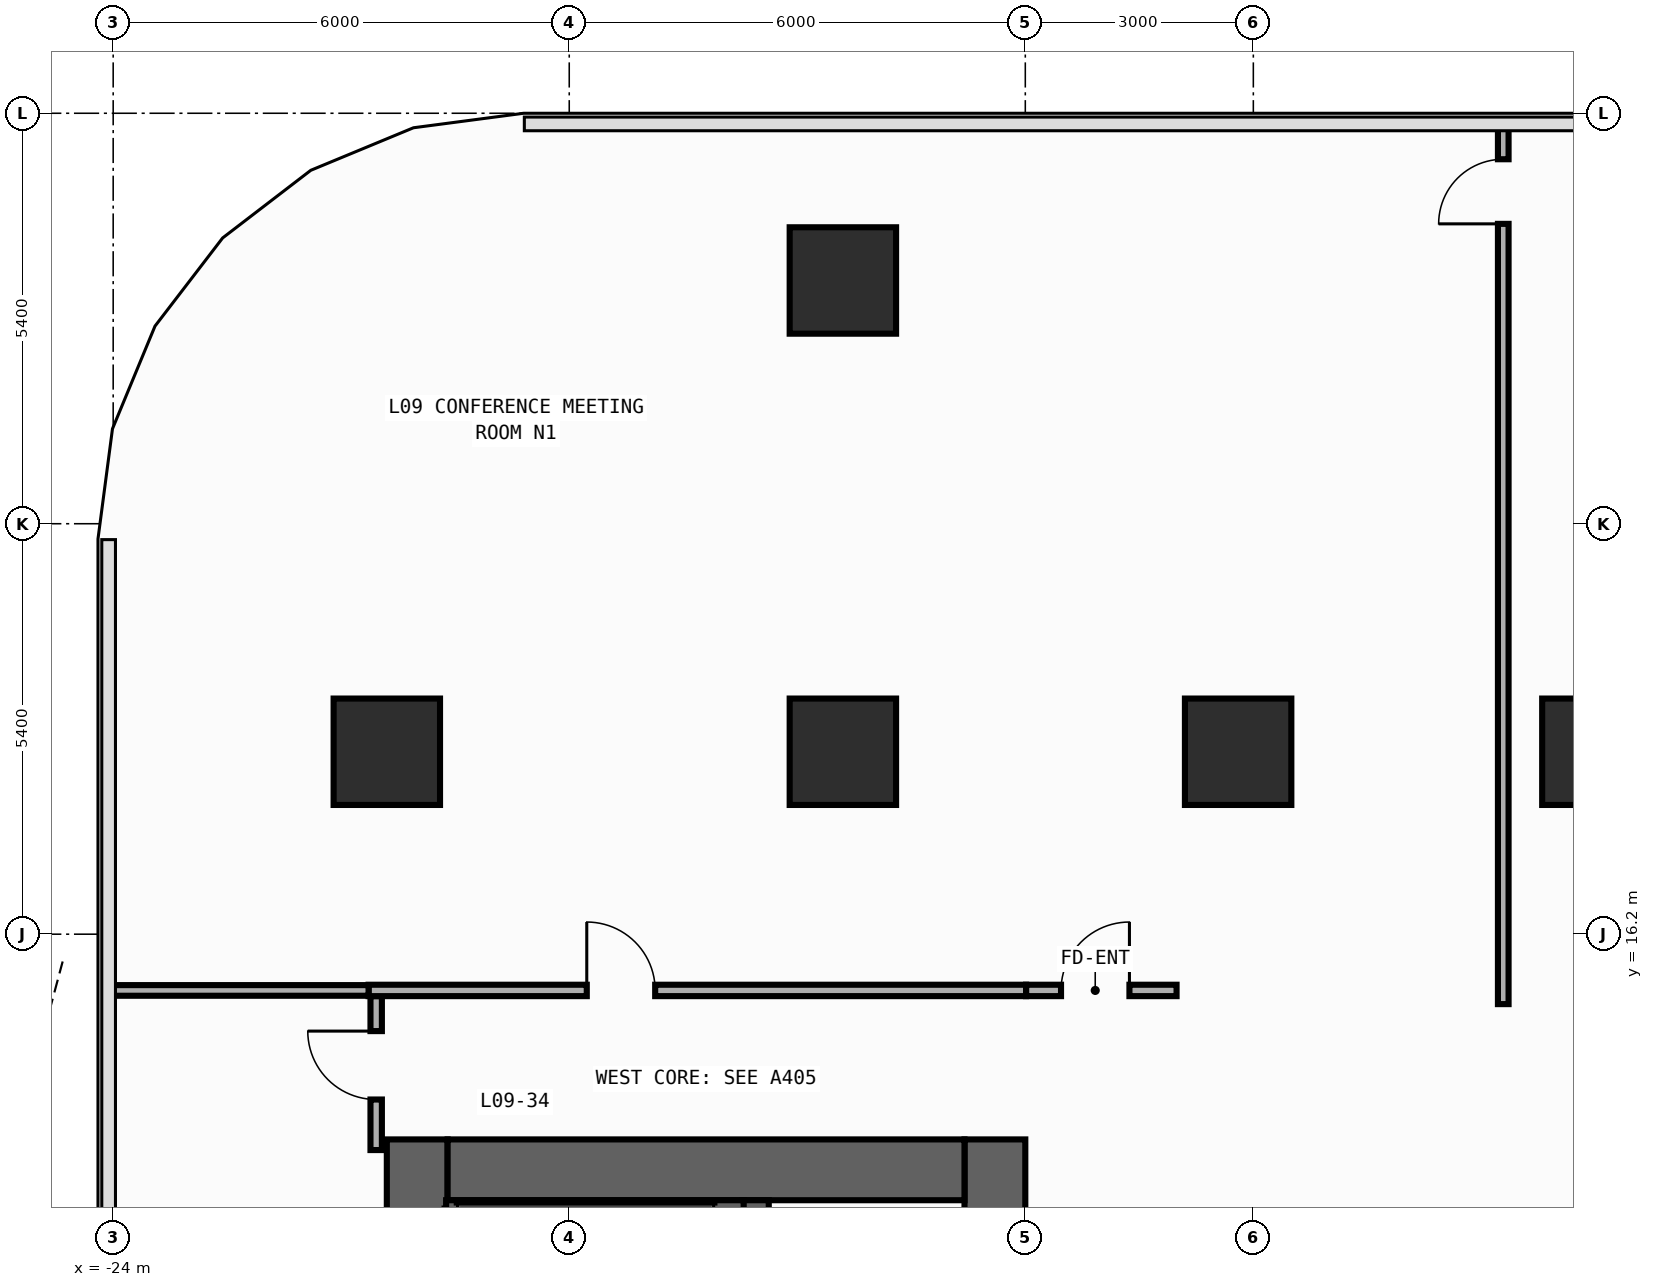
"""IFC4 building model, lengths in metres.
Left out: names, types, materials, properties, quantities, classifications, styles, units other than length and angle.
Written with IfcOpenShell. Run it as: python <this file> out.ifc"""

import sys

from ifc_helpers import new_model, si_unit, direction, frame, frame_2d, origin, origin_2d, place, context, subcontext, project, spatial, rectangle, extrude, element, fill, save


model = new_model("IFC4")
c1 = context("Model", 3, precision=1e-05, world=origin(), true_north=direction((0.0, 1.0)))
c2 = subcontext(c1, "Body", "Model", "MODEL_VIEW")
j1 = project(units=[si_unit("LENGTHUNIT", "METRE"), si_unit("PLANEANGLEUNIT", "RADIAN")], contexts=[c1])
p1 = place(None, origin())
s1 = spatial("IfcSite", under=j1, at=p1, CompositionType="ELEMENT")
p2 = place(p1, origin())
s2 = spatial("IfcBuilding", under=s1, at=p2, CompositionType="ELEMENT")
p3 = place(p2, frame((0.0, 0.0, 38.6)))
s3 = spatial("IfcBuildingStorey", under=s2, at=p3, CompositionType="ELEMENT", Elevation=38.6)
p4 = place(p3, frame((-20.0, -13.5, 0.0), z_axis=(0.0, 0.0, 1.0), x_axis=(0.0, 1.0, 0.0)))
e1 = element("IfcWall", 1, at=p4, inside=s3, PredefinedType="SHEAR", context=c2, shape_type="SweptSolid", body=[
    extrude(rectangle(XDim=27.0, YDim=0.8, at=frame_2d((13.5, 0.0))), origin(), (0.0, 0.0, 1.0), 3.94),
])
p5 = place(p3, frame((-12.4, -13.5, 0.0), z_axis=(0.0, 0.0, 1.0), x_axis=(0.0, 1.0, 0.0)))
e2 = element("IfcWall", 2, at=p5, inside=s3, PredefinedType="SHEAR", context=c2, shape_type="SweptSolid", body=[
    extrude(rectangle(XDim=27.0, YDim=0.8, at=frame_2d((13.5, 0.0))), origin(), (0.0, 0.0, 1.0), 3.94),
])
p6 = place(p5, frame((21.55, 0.0, 0.0)))
e3 = element("IfcOpeningElement", 3, at=p6, cuts=e2, PredefinedType="OPENING", context=c2, shape_type="SweptSolid", body=[
    extrude(rectangle(XDim=1.1, YDim=2.2, at=frame_2d((0.55, 1.1))), frame((0.0, 0.41, 0.0), z_axis=(0.0, -1.0, 0.0), x_axis=(1.0, 0.0, 0.0)), (0.0, 0.0, 1.0), 0.82),
])
p7 = place(p5, frame((18.35, 0.0, 0.0)))
e4 = element("IfcOpeningElement", 4, at=p7, cuts=e2, PredefinedType="OPENING", context=c2, shape_type="SweptSolid", body=[
    extrude(rectangle(XDim=1.1, YDim=2.2, at=frame_2d((0.55, 1.1))), frame((0.0, 0.41, 0.0), z_axis=(0.0, -1.0, 0.0), x_axis=(1.0, 0.0, 0.0)), (0.0, 0.0, 1.0), 0.82),
])
p8 = place(p5, frame((15.15, 0.0, 0.0)))
e5 = element("IfcOpeningElement", 5, at=p8, cuts=e2, PredefinedType="OPENING", context=c2, shape_type="SweptSolid", body=[
    extrude(rectangle(XDim=1.1, YDim=2.2, at=frame_2d((0.55, 1.1))), frame((0.0, 0.41, 0.0), z_axis=(0.0, -1.0, 0.0), x_axis=(1.0, 0.0, 0.0)), (0.0, 0.0, 1.0), 0.82),
])
p9 = place(p5, frame((10.35, 0.0, 0.0)))
e6 = element("IfcOpeningElement", 6, at=p9, cuts=e2, PredefinedType="OPENING", context=c2, shape_type="SweptSolid", body=[
    extrude(rectangle(XDim=1.1, YDim=2.2, at=frame_2d((0.55, 1.1))), frame((0.0, 0.41, 0.0), z_axis=(0.0, -1.0, 0.0), x_axis=(1.0, 0.0, 0.0)), (0.0, 0.0, 1.0), 0.82),
])
p10 = place(p5, frame((7.15, 0.0, 0.0)))
e7 = element("IfcOpeningElement", 7, at=p10, cuts=e2, PredefinedType="OPENING", context=c2, shape_type="SweptSolid", body=[
    extrude(rectangle(XDim=1.1, YDim=2.2, at=frame_2d((0.55, 1.1))), frame((0.0, 0.41, 0.0), z_axis=(0.0, -1.0, 0.0), x_axis=(1.0, 0.0, 0.0)), (0.0, 0.0, 1.0), 0.82),
])
p11 = place(p5, frame((3.95, 0.0, 0.0)))
e8 = element("IfcOpeningElement", 8, at=p11, cuts=e2, PredefinedType="OPENING", context=c2, shape_type="SweptSolid", body=[
    extrude(rectangle(XDim=1.1, YDim=2.2, at=frame_2d((0.55, 1.1))), frame((0.0, 0.41, 0.0), z_axis=(0.0, -1.0, 0.0), x_axis=(1.0, 0.0, 0.0)), (0.0, 0.0, 1.0), 0.82),
])
p12 = place(p5, frame((12.725, 0.0, 0.0)))
e9 = element("IfcOpeningElement", 9, at=p12, cuts=e2, PredefinedType="OPENING", context=c2, shape_type="SweptSolid", body=[
    extrude(rectangle(XDim=1.15, YDim=2.2, at=frame_2d((0.575, 1.1))), frame((0.0, 0.41, 0.0), z_axis=(0.0, -1.0, 0.0), x_axis=(1.0, 0.0, 0.0)), (0.0, 0.0, 1.0), 0.82),
])
p13 = place(p5, frame((1.625, 0.0, 0.0)))
e10 = element("IfcOpeningElement", 10, at=p13, cuts=e2, PredefinedType="OPENING", context=c2, shape_type="SweptSolid", body=[
    extrude(rectangle(XDim=0.85, YDim=2.1, at=frame_2d((0.425, 1.05))), frame((0.0, 0.41, 0.0), z_axis=(0.0, -1.0, 0.0), x_axis=(1.0, 0.0, 0.0)), (0.0, 0.0, 1.0), 0.82),
])
p14 = place(p3, frame((-19.6, 13.1, 0.0), z_axis=(0.0, 0.0, 1.0), x_axis=(1.0, 0.0, 0.0)))
e11 = element("IfcWall", 11, at=p14, inside=s3, PredefinedType="SHEAR", context=c2, shape_type="SweptSolid", body=[
    extrude(rectangle(XDim=6.8, YDim=0.8, at=frame_2d((3.4, 0.0))), origin(), (0.0, 0.0, 1.0), 3.94),
])
p15 = place(p3, frame((-15.55, -12.7, 0.0), z_axis=(0.0, 0.0, 1.0), x_axis=(0.0, 1.0, 0.0)))
e12 = element("IfcWall", 12, at=p15, inside=s3, PredefinedType="SHEAR", context=c2, shape_type="SweptSolid", body=[
    extrude(rectangle(XDim=25.4, YDim=0.35, at=frame_2d((12.7, 0.0))), origin(), (0.0, 0.0, 1.0), 3.94),
])
p16 = place(p15, frame((11.925, 0.0, 0.0)))
e13 = element("IfcOpeningElement", 13, at=p16, cuts=e12, PredefinedType="OPENING", context=c2, shape_type="SweptSolid", body=[
    extrude(rectangle(XDim=1.15, YDim=2.2, at=frame_2d((0.575, 1.1))), frame((0.0, 0.185, 0.0), z_axis=(0.0, -1.0, 0.0), x_axis=(1.0, 0.0, 0.0)), (0.0, 0.0, 1.0), 0.37),
])
p17 = place(p15, frame((0.825, 0.0, 0.0)))
e14 = element("IfcOpeningElement", 14, at=p17, cuts=e12, PredefinedType="OPENING", context=c2, shape_type="SweptSolid", body=[
    extrude(rectangle(XDim=0.85, YDim=2.1, at=frame_2d((0.425, 1.05))), frame((0.0, 0.185, 0.0), z_axis=(0.0, -1.0, 0.0), x_axis=(1.0, 0.0, 0.0)), (0.0, 0.0, 1.0), 0.37),
])
p18 = place(p3, frame((-19.62, 12.59, 0.0), z_axis=(0.0, 0.0, 1.0), x_axis=(1.0, 0.0, 0.0)))
e15 = element("IfcWall", 15, at=p18, inside=s3, PredefinedType="SHEAR", context=c2, shape_type="SweptSolid", body=[
    extrude(rectangle(XDim=3.915, YDim=0.22, at=frame_2d((1.958, 0.0))), origin(), (0.0, 0.0, 1.0), 3.94),
])
for number, where, z_axis, x_axis in (
    (16, (-9.2, 18.6, 0.0), (0.0, 0.0, 1.0), (1.0, 0.0, 0.0)),
    (17, (-20.4, 18.6, 0.0), (0.0, 0.0, 1.0), (1.0, 0.0, 0.0)),
    (18, (-14.4, 18.6, 0.0), (0.0, 0.0, 1.0), (1.0, 0.0, 0.0)),
    (19, (-4.5, 18.6, 0.0), (0.0, 0.0, 1.0), (1.0, 0.0, 0.0)),
    (20, (-14.4, 24.8, 0.0), (0.0, 0.0, 1.0), (1.0, 0.0, 0.0)),
):
    element("IfcColumn", number, at=place(p3, frame(where, z_axis=z_axis, x_axis=x_axis)), inside=s3, PredefinedType="COLUMN", context=c2, shape_type="SweptSolid", body=[
        extrude(rectangle(XDim=1.4, YDim=1.4, at=origin_2d()), origin(), (0.0, 0.0, 1.0), 4.2),
    ])
p19 = place(p3, frame((-11.99, 15.46, 0.0), z_axis=(0.0, 0.0, 1.0), x_axis=(1.0, 0.0, 0.0)))
e21 = element("IfcWall", 21, at=p19, inside=s3, PredefinedType="PARTITIONING", context=c2, shape_type="SweptSolid", body=[
    extrude(rectangle(XDim=1.98, YDim=0.15, at=frame_2d((0.99, 0.0))), origin(), (0.0, 0.0, 1.0), 3.94),
])
p20 = place(p19, frame((0.46, 0.0, 0.0)))
e22 = element("IfcOpeningElement", 22, at=p20, cuts=e21, PredefinedType="OPENING", context=c2, shape_type="SweptSolid", body=[
    extrude(rectangle(XDim=0.9, YDim=2.15, at=frame_2d((0.45, 1.075))), frame((0.0, 0.085, 0.0), z_axis=(0.0, -1.0, 0.0), x_axis=(1.0, 0.0, 0.0)), (0.0, 0.0, 1.0), 0.17),
])
p21 = place(p3, frame((-20.54, 13.36, 0.0), z_axis=(0.0, 0.0, 1.0), x_axis=(0.0, 1.0, 0.0)))
e23 = element("IfcWall", 23, at=p21, inside=s3, PredefinedType="PARTITIONING", context=c2, shape_type="SweptSolid", body=[
    extrude(rectangle(XDim=2.025, YDim=0.15, at=frame_2d((1.012, 0.0))), origin(), (0.0, 0.0, 1.0), 3.94),
])
p22 = place(p21, frame((0.665, 0.0, 0.0)))
e24 = element("IfcOpeningElement", 24, at=p22, cuts=e23, PredefinedType="OPENING", context=c2, shape_type="SweptSolid", body=[
    extrude(rectangle(XDim=0.9, YDim=2.15, at=frame_2d((0.45, 1.075))), frame((0.0, 0.085, 0.0), z_axis=(0.0, -1.0, 0.0), x_axis=(1.0, 0.0, 0.0)), (0.0, 0.0, 1.0), 0.17),
])
p23 = place(p3, frame((-20.64, 15.46, 0.0), z_axis=(0.0, 0.0, 1.0), x_axis=(1.0, 0.0, 0.0)))
e25 = element("IfcWall", 25, at=p23, inside=s3, PredefinedType="PARTITIONING", context=c2, shape_type="SweptSolid", body=[
    extrude(rectangle(XDim=8.65, YDim=0.15, at=frame_2d((4.325, 0.0))), origin(), (0.0, 0.0, 1.0), 3.94),
])
p24 = place(p23, frame((2.871, 0.0, 0.0)))
e26 = element("IfcOpeningElement", 26, at=p24, cuts=e25, PredefinedType="OPENING", context=c2, shape_type="SweptSolid", body=[
    extrude(rectangle(XDim=0.9, YDim=2.15, at=frame_2d((0.45, 1.075))), frame((0.0, 0.085, 0.0), z_axis=(0.0, -1.0, 0.0), x_axis=(1.0, 0.0, 0.0)), (0.0, 0.0, 1.0), 0.17),
])
p25 = place(p3, frame((-24.055, 15.46, 0.0), z_axis=(0.0, 0.0, 1.0), x_axis=(1.0, 0.0, 0.0)))
e27 = element("IfcWall", 27, at=p25, inside=s3, PredefinedType="PARTITIONING", context=c2, shape_type="SweptSolid", body=[
    extrude(rectangle(XDim=3.415, YDim=0.14, at=frame_2d((1.708, 0.0))), origin(), (0.0, 0.0, 1.0), 3.94),
])
p26 = place(p3, frame((-5.712, 15.28, 0.0), z_axis=(0.0, 0.0, 1.0), x_axis=(0.0, 1.0, 0.0)))
e28 = element("IfcWall", 28, at=p26, inside=s3, PredefinedType="PARTITIONING", context=c2, shape_type="SweptSolid", body=[
    extrude(rectangle(XDim=11.575, YDim=0.14, at=frame_2d((5.788, 0.0))), origin(), (0.0, 0.0, 1.0), 3.94),
])
p27 = place(p26, frame((10.265, 0.0, 0.0)))
e29 = element("IfcOpeningElement", 29, at=p27, cuts=e28, PredefinedType="OPENING", context=c2, shape_type="SweptSolid", body=[
    extrude(rectangle(XDim=0.85, YDim=2.1, at=frame_2d((0.425, 1.05))), frame((0.0, 0.08, 0.0), z_axis=(0.0, -1.0, 0.0), x_axis=(1.0, 0.0, 0.0)), (0.0, 0.0, 1.0), 0.16),
])
p28 = place(p20, origin())
e30 = element("IfcDoor", 30, at=p28, inside=s3, OperationType="SINGLE_SWING_RIGHT", PredefinedType="DOOR", context=c2, shape_type="SweptSolid", body=[
    extrude(rectangle(XDim=0.9, YDim=2.15, at=frame_2d((0.45, 1.075))), frame((0.0, 0.025, 0.0), z_axis=(0.0, -1.0, 0.0), x_axis=(1.0, 0.0, 0.0)), (0.0, 0.0, 1.0), 0.05),
])
fill(e22, e30)
p29 = place(p22, origin())
e31 = element("IfcDoor", 31, at=p29, inside=s3, OperationType="SINGLE_SWING_RIGHT", PredefinedType="DOOR", context=c2, shape_type="SweptSolid", body=[
    extrude(rectangle(XDim=0.9, YDim=2.15, at=frame_2d((0.45, 1.075))), frame((0.0, 0.025, 0.0), z_axis=(0.0, -1.0, 0.0), x_axis=(1.0, 0.0, 0.0)), (0.0, 0.0, 1.0), 0.05),
])
fill(e24, e31)
p30 = place(p24, origin())
e32 = element("IfcDoor", 32, at=p30, inside=s3, OperationType="SINGLE_SWING_LEFT", PredefinedType="DOOR", context=c2, shape_type="SweptSolid", body=[
    extrude(rectangle(XDim=0.9, YDim=2.15, at=frame_2d((0.45, 1.075))), frame((0.0, 0.025, 0.0), z_axis=(0.0, -1.0, 0.0), x_axis=(1.0, 0.0, 0.0)), (0.0, 0.0, 1.0), 0.05),
])
fill(e26, e32)
p31 = place(p27, origin())
e33 = element("IfcDoor", 33, at=p31, inside=s3, OperationType="SINGLE_SWING_LEFT", PredefinedType="DOOR", context=c2, shape_type="SweptSolid", body=[
    extrude(rectangle(XDim=0.85, YDim=2.1, at=frame_2d((0.425, 1.05))), frame((0.0, 0.025, 0.0), z_axis=(0.0, -1.0, 0.0), x_axis=(1.0, 0.0, 0.0)), (0.0, 0.0, 1.0), 0.05),
])
fill(e29, e33)
save(model, sys.argv[1])
